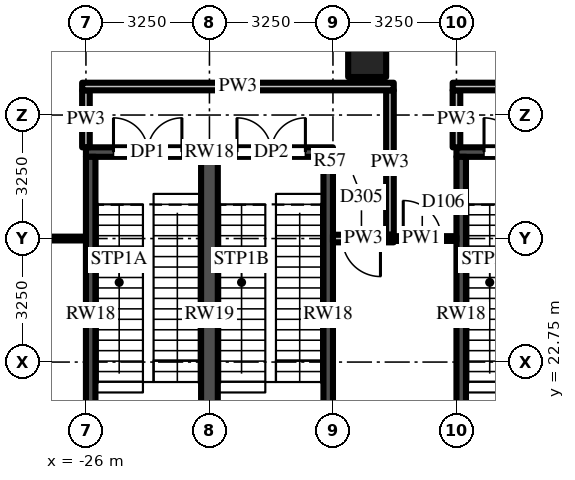
"""IFC4 building model, lengths in metres.
Left out: names, types, materials, properties, quantities, classifications, styles, units other than length and angle.
Written with IfcOpenShell. Run it as: python <this file> out.ifc"""

import sys

from ifc_helpers import new_model, si_unit, direction, frame, frame_2d, origin, origin_2d, place, context, subcontext, project, spatial, rectangle, extrude, source, transform, mapped, element, fill, save


model = new_model("IFC4")
c1 = context("Model", 3, precision=1e-05, world=origin(), true_north=direction((0.0, 1.0)))
c2 = subcontext(c1, "Body", "Model", "MODEL_VIEW")
j1 = project(units=[si_unit("LENGTHUNIT", "METRE"), si_unit("PLANEANGLEUNIT", "RADIAN")], contexts=[c1])
p1 = place(None, origin())
s1 = spatial("IfcSite", under=j1, at=p1, CompositionType="ELEMENT")
p2 = place(p1, origin())
s2 = spatial("IfcBuilding", under=s1, at=p2, CompositionType="ELEMENT")
p3 = place(p2, frame((0.0, 0.0, 24.0)))
s3 = spatial("IfcBuildingStorey", under=s2, at=p3, CompositionType="ELEMENT", Elevation=24.0)
m1 = source(origin(), c2, "Body", "SweptSolid", [
    extrude(rectangle(XDim=1.0, YDim=1.0, at=origin_2d()), origin(), (0.0, 0.0, 1.0), 5.0),
])
p4 = place(p3, frame((-18.6, 30.75, 0.0), z_axis=(0.0, 0.0, 1.0), x_axis=(1.0, 0.0, 0.0)))
e1 = element("IfcColumn", 1, at=p4, inside=s3, PredefinedType="COLUMN", context=c2, shape_type="MappedRepresentation", body=[
    mapped(m1, transform((0.0, 0.0, 0.0))),
])
m2 = source(origin(), c2, "Body", "SweptSolid", [
    extrude(rectangle(XDim=6.5, YDim=0.25, at=frame_2d((3.25, 0.0))), origin(), (0.0, 0.0, 1.0), 4.7),
])
p5 = place(p3, frame((-26.0, 28.275, 0.0), z_axis=(0.0, 0.0, 1.0), x_axis=(1.0, 0.0, 0.0)))
e2 = element("IfcWall", 2, at=p5, inside=s3, PredefinedType="SHEAR", context=c2, shape_type="MappedRepresentation", body=[
    mapped(m2, transform((0.0, 0.0, 0.0))),
])
m3 = source(origin(), c2, "Body", "SweptSolid", [
    extrude(rectangle(XDim=1.8, YDim=2.1, at=frame_2d((0.9, 1.05))), frame((0.0, 0.135, 0.0), z_axis=(0.0, -1.0, 0.0), x_axis=(1.0, 0.0, 0.0)), (0.0, 0.0, 1.0), 0.27),
])
p6 = place(p5, frame((0.725, 0.0, 0.0)))
e3 = element("IfcOpeningElement", 3, at=p6, cuts=e2, PredefinedType="OPENING", context=c2, shape_type="MappedRepresentation", body=[
    mapped(m3, transform((0.0, 0.0, 0.0))),
])
p7 = place(p5, frame((3.975, 0.0, 0.0)))
e4 = element("IfcOpeningElement", 4, at=p7, cuts=e2, PredefinedType="OPENING", context=c2, shape_type="MappedRepresentation", body=[
    mapped(m3, transform((0.0, 0.0, 0.0))),
])
m4 = source(origin(), c2, "Body", "SweptSolid", [
    extrude(rectangle(XDim=8.3, YDim=0.25, at=frame_2d((4.15, 0.0))), origin(), (0.0, 0.0, 1.0), 4.7),
])
for number, where, z_axis, x_axis in (
    (5, (-25.875, 19.85, 0.0), (0.0, 0.0, 1.0), (0.0, 1.0, 0.0)),
    (6, (-19.625, 19.85, 0.0), (0.0, 0.0, 1.0), (0.0, 1.0, 0.0)),
):
    element("IfcWall", number, at=place(p3, frame(where, z_axis=z_axis, x_axis=x_axis)), inside=s3, PredefinedType="SHEAR", context=c2, shape_type="MappedRepresentation", body=[
        mapped(m4, transform((0.0, 0.0, 0.0))),
    ])
m5 = source(origin(), c2, "Body", "SweptSolid", [
    extrude(rectangle(XDim=8.3, YDim=0.44, at=frame_2d((4.15, 0.0))), origin(), (0.0, 0.0, 1.0), 4.7),
])
p8 = place(p3, frame((-22.75, 19.85, 0.0), z_axis=(0.0, 0.0, 1.0), x_axis=(0.0, 1.0, 0.0)))
e7 = element("IfcWall", 7, at=p8, inside=s3, PredefinedType="SHEAR", context=c2, shape_type="MappedRepresentation", body=[
    mapped(m5, transform((0.0, 0.0, 0.0))),
])
p9 = place(p3, frame((-16.25, 28.275, 0.0), z_axis=(0.0, 0.0, 1.0), x_axis=(1.0, 0.0, 0.0)))
e8 = element("IfcWall", 8, at=p9, inside=s3, PredefinedType="SHEAR", context=c2, shape_type="MappedRepresentation", body=[
    mapped(m2, transform((0.0, 0.0, 0.0))),
])
p10 = place(p9, frame((0.725, 0.0, 0.0)))
e9 = element("IfcOpeningElement", 9, at=p10, cuts=e8, PredefinedType="OPENING", context=c2, shape_type="MappedRepresentation", body=[
    mapped(m3, transform((0.0, 0.0, 0.0))),
])
p11 = place(p9, frame((3.975, 0.0, 0.0)))
e10 = element("IfcOpeningElement", 10, at=p11, cuts=e8, PredefinedType="OPENING", context=c2, shape_type="MappedRepresentation", body=[
    mapped(m3, transform((0.0, 0.0, 0.0))),
])
p12 = place(p3, frame((-16.125, 19.85, 0.0), z_axis=(0.0, 0.0, 1.0), x_axis=(0.0, 1.0, 0.0)))
e11 = element("IfcWall", 11, at=p12, inside=s3, PredefinedType="SHEAR", context=c2, shape_type="MappedRepresentation", body=[
    mapped(m4, transform((0.0, 0.0, 0.0))),
])
m6 = source(origin(), c2, "Body", "SweptSolid", [
    extrude(rectangle(XDim=1.5, YDim=0.2, at=frame_2d((0.75, 0.0))), origin(), (0.0, 0.0, 1.0), 4.7),
])
p13 = place(p3, frame((-26.0, 28.4, 0.0), z_axis=(0.0, 0.0, 1.0), x_axis=(0.0, 1.0, 0.0)))
e12 = element("IfcWall", 12, at=p13, inside=s3, PredefinedType="PARTITIONING", context=c2, shape_type="MappedRepresentation", body=[
    mapped(m6, transform((0.0, 0.0, 0.0))),
])
m7 = source(origin(), c2, "Body", "SweptSolid", [
    extrude(rectangle(XDim=3.8, YDim=0.2, at=frame_2d((1.9, 0.0))), origin(), (0.0, 0.0, 1.0), 4.274),
])
p14 = place(p3, frame((-18.0, 26.1, 0.0), z_axis=(0.0, 0.0, 1.0), x_axis=(0.0, 1.0, 0.0)))
e13 = element("IfcWall", 13, at=p14, inside=s3, PredefinedType="PARTITIONING", context=c2, shape_type="MappedRepresentation", body=[
    mapped(m7, transform((0.0, 0.0, 0.0))),
])
p15 = place(p3, frame((-16.25, 28.4, 0.0), z_axis=(0.0, 0.0, 1.0), x_axis=(0.0, 1.0, 0.0)))
e14 = element("IfcWall", 14, at=p15, inside=s3, PredefinedType="PARTITIONING", context=c2, shape_type="MappedRepresentation", body=[
    mapped(m6, transform((0.0, 0.0, 0.0))),
])
m8 = source(origin(), c2, "Body", "SweptSolid", [
    extrude(rectangle(XDim=1.6, YDim=0.2, at=frame_2d((0.8, 0.0))), origin(), (0.0, 0.0, 1.0), 3.762),
])
p16 = place(p3, frame((-17.9, 26.0, 0.0), z_axis=(0.0, 0.0, 1.0), x_axis=(-1.0, 0.0, 0.0)))
e15 = element("IfcWall", 15, at=p16, inside=s3, PredefinedType="PARTITIONING", context=c2, shape_type="MappedRepresentation", body=[
    mapped(m8, transform((0.0, 0.0, 0.0))),
])
m9 = source(origin(), c2, "Body", "SweptSolid", [
    extrude(rectangle(XDim=1.0, YDim=2.1, at=frame_2d((0.5, 1.05))), frame((0.0, 0.11, 0.0), z_axis=(0.0, -1.0, 0.0), x_axis=(1.0, 0.0, 0.0)), (0.0, 0.0, 1.0), 0.22),
])
p17 = place(p16, frame((0.35, 0.0, 0.0)))
e16 = element("IfcOpeningElement", 16, at=p17, cuts=e15, PredefinedType="OPENING", context=c2, shape_type="MappedRepresentation", body=[
    mapped(m9, transform((0.0, 0.0, 0.0))),
])
m10 = source(origin(), c2, "Body", "SweptSolid", [
    extrude(rectangle(XDim=6.3, YDim=0.1, at=frame_2d((3.15, 0.0))), origin(), (0.0, 0.0, 1.0), 3.762),
])
p18 = place(p3, frame((-32.3, 26.0, 0.0), z_axis=(0.0, 0.0, 1.0), x_axis=(1.0, 0.0, 0.0)))
e17 = element("IfcWall", 17, at=p18, inside=s3, PredefinedType="PARTITIONING", context=c2, shape_type="MappedRepresentation", body=[
    mapped(m10, transform((0.0, 0.0, 0.0))),
])
m11 = source(origin(), c2, "Body", "SweptSolid", [
    extrude(rectangle(XDim=1.85, YDim=0.125, at=frame_2d((0.925, 0.0))), origin(), (0.0, 0.0, 1.0), 4.7),
])
p19 = place(p3, frame((-18.1, 26.0, 0.0), z_axis=(0.0, 0.0, 1.0), x_axis=(1.0, 0.0, 0.0)))
e18 = element("IfcWall", 18, at=p19, inside=s3, PredefinedType="PARTITIONING", context=c2, shape_type="MappedRepresentation", body=[
    mapped(m11, transform((0.0, 0.0, 0.0))),
])
m12 = source(origin(), c2, "Body", "SweptSolid", [
    extrude(rectangle(XDim=1.0, YDim=2.1, at=frame_2d((0.5, 1.05))), frame((0.0, 0.073, 0.0), z_axis=(0.0, -1.0, 0.0), x_axis=(1.0, 0.0, 0.0)), (0.0, 0.0, 1.0), 0.145),
])
p20 = place(p19, frame((0.45, 0.0, 0.0)))
e19 = element("IfcOpeningElement", 19, at=p20, cuts=e18, PredefinedType="OPENING", context=c2, shape_type="MappedRepresentation", body=[
    mapped(m12, transform((0.0, 0.0, 0.0))),
])
m13 = source(origin(), c2, "Body", "SweptSolid", [
    extrude(rectangle(XDim=8.2, YDim=0.2, at=frame_2d((4.1, 0.0))), origin(), (0.0, 0.0, 1.0), 3.762),
])
p21 = place(p3, frame((-17.9, 30.0, 0.0), z_axis=(0.0, 0.0, 1.0), x_axis=(-1.0, 0.0, 0.0)))
e20 = element("IfcWall", 20, at=p21, inside=s3, PredefinedType="PARTITIONING", context=c2, shape_type="MappedRepresentation", body=[
    mapped(m13, transform((0.0, 0.0, 0.0))),
])
m14 = source(origin(), c2, "Body", "SweptSolid", [
    extrude(rectangle(XDim=8.2, YDim=0.2, at=frame_2d((4.1, 0.0))), origin(), (0.0, 0.0, 1.0), 4.7),
])
p22 = place(p3, frame((-8.15, 30.0, 0.0), z_axis=(0.0, 0.0, 1.0), x_axis=(-1.0, 0.0, 0.0)))
e21 = element("IfcWall", 21, at=p22, inside=s3, PredefinedType="PARTITIONING", context=c2, shape_type="MappedRepresentation", body=[
    mapped(m14, transform((0.0, 0.0, 0.0))),
])
m15 = source(origin(), c2, "Body", "SweptSolid", [
    extrude(rectangle(XDim=1.8, YDim=2.1, at=frame_2d((0.9, 1.05))), frame((0.0, 0.025, 0.0), z_axis=(0.0, -1.0, 0.0), x_axis=(1.0, 0.0, 0.0)), (0.0, 0.0, 1.0), 0.05),
])
p23 = place(p6, origin())
e22 = element("IfcDoor", 22, at=p23, inside=s3, OperationType="DOUBLE_DOOR_SINGLE_SWING", PredefinedType="DOOR", context=c2, shape_type="MappedRepresentation", body=[
    mapped(m15, transform((0.0, 0.0, 0.0))),
])
fill(e3, e22)
p24 = place(p7, origin())
e23 = element("IfcDoor", 23, at=p24, inside=s3, OperationType="DOUBLE_DOOR_SINGLE_SWING", PredefinedType="DOOR", context=c2, shape_type="MappedRepresentation", body=[
    mapped(m15, transform((0.0, 0.0, 0.0))),
])
fill(e4, e23)
p25 = place(p10, origin())
e24 = element("IfcDoor", 24, at=p25, inside=s3, OperationType="DOUBLE_DOOR_SINGLE_SWING", PredefinedType="DOOR", context=c2, shape_type="MappedRepresentation", body=[
    mapped(m15, transform((0.0, 0.0, 0.0))),
])
fill(e9, e24)
m16 = source(origin(), c2, "Body", "SweptSolid", [
    extrude(rectangle(XDim=1.0, YDim=2.1, at=frame_2d((0.5, 1.05))), frame((0.0, 0.025, 0.0), z_axis=(0.0, -1.0, 0.0), x_axis=(1.0, 0.0, 0.0)), (0.0, 0.0, 1.0), 0.05),
])
p26 = place(p17, origin())
e25 = element("IfcDoor", 25, at=p26, inside=s3, OperationType="SINGLE_SWING_LEFT", PredefinedType="DOOR", context=c2, shape_type="MappedRepresentation", body=[
    mapped(m16, transform((0.0, 0.0, 0.0))),
])
fill(e16, e25)
p27 = place(p20, origin())
e26 = element("IfcDoor", 26, at=p27, inside=s3, OperationType="SINGLE_SWING_LEFT", PredefinedType="DOOR", context=c2, shape_type="MappedRepresentation", body=[
    mapped(m16, transform((0.0, 0.0, 0.0))),
])
fill(e19, e26)
save(model, sys.argv[1])
